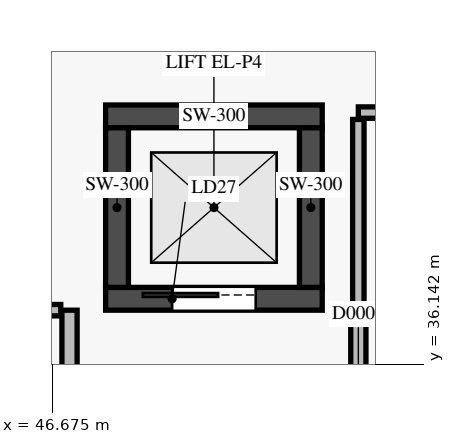
"""IFC4 building model, lengths in metres.
Left out: names, types, materials, properties, quantities, classifications, styles, units other than length and angle.
Written with IfcOpenShell. Run it as: python <this file> out.ifc"""

import sys

from ifc_helpers import new_model, si_unit, direction, frame, frame_2d, origin, place, context, subcontext, project, spatial, rectangle, extrude, element, fill, save


model = new_model("IFC4")
c1 = context("Model", 3, precision=1e-05, world=origin(), true_north=direction((0.0, 1.0)))
c2 = subcontext(c1, "Body", "Model", "MODEL_VIEW")
j1 = project(units=[si_unit("LENGTHUNIT", "METRE"), si_unit("PLANEANGLEUNIT", "RADIAN")], contexts=[c1])
p1 = place(None, origin())
s1 = spatial("IfcSite", under=j1, at=p1, CompositionType="ELEMENT")
p2 = place(p1, origin())
s2 = spatial("IfcBuilding", under=s1, at=p2, CompositionType="ELEMENT")
p3 = place(p2, origin())
s3 = spatial("IfcBuildingStorey", under=s2, at=p3, CompositionType="ELEMENT", Elevation=0.0)
p4 = place(p3, frame((47.375, 37.0, 0.0), z_axis=(0.0, 0.0, 1.0), x_axis=(1.0, 0.0, 0.0)))
e1 = element("IfcWall", 1, at=p4, inside=s3, PredefinedType="SHEAR", context=c2, shape_type="SweptSolid", body=[
    extrude(rectangle(XDim=2.85, YDim=0.3, at=frame_2d((1.425, 0.0))), origin(), (0.0, 0.0, 1.0), 4.55),
])
p5 = place(p4, frame((0.875, 0.0, 0.0)))
e2 = element("IfcOpeningElement", 2, at=p5, cuts=e1, PredefinedType="OPENING", context=c2, shape_type="SweptSolid", body=[
    extrude(rectangle(XDim=1.1, YDim=2.15, at=frame_2d((0.55, 1.075))), frame((0.0, 0.16, 0.0), z_axis=(0.0, -1.0, 0.0), x_axis=(1.0, 0.0, 0.0)), (0.0, 0.0, 1.0), 0.32),
])
p6 = place(p3, frame((47.375, 39.4, 0.0), z_axis=(0.0, 0.0, 1.0), x_axis=(1.0, 0.0, 0.0)))
e3 = element("IfcWall", 3, at=p6, inside=s3, PredefinedType="SHEAR", context=c2, shape_type="SweptSolid", body=[
    extrude(rectangle(XDim=2.85, YDim=0.3, at=frame_2d((1.425, 0.0))), origin(), (0.0, 0.0, 1.0), 4.55),
])
for number, where, z_axis, x_axis in (
    (4, (47.525, 37.15, 0.0), (0.0, 0.0, 1.0), (0.0, 1.0, 0.0)),
    (5, (50.075, 37.15, 0.0), (0.0, 0.0, 1.0), (0.0, 1.0, 0.0)),
):
    element("IfcWall", number, at=place(p3, frame(where, z_axis=z_axis, x_axis=x_axis)), inside=s3, PredefinedType="SHEAR", context=c2, shape_type="SweptSolid", body=[
        extrude(rectangle(XDim=2.1, YDim=0.3, at=frame_2d((1.05, 0.0))), origin(), (0.0, 0.0, 1.0), 4.55),
    ])
p7 = place(p3, frame((50.7, 33.25, 0.0), z_axis=(0.0, 0.0, 1.0), x_axis=(0.0, 1.0, 0.0)))
e6 = element("IfcWall", 6, at=p7, inside=s3, PredefinedType="PARTITIONING", context=c2, shape_type="SweptSolid", body=[
    extrude(rectangle(XDim=3.6, YDim=0.2, at=frame_2d((1.8, 0.0))), origin(), (0.0, 0.0, 1.0), 3.735),
])
p8 = place(p7, frame((1.1, 0.0, 0.0)))
e7 = element("IfcOpeningElement", 7, at=p8, cuts=e6, PredefinedType="OPENING", context=c2, shape_type="SweptSolid", body=[
    extrude(rectangle(XDim=1.4, YDim=2.2, at=frame_2d((0.7, 1.1))), frame((0.0, 0.11, 0.0), z_axis=(0.0, -1.0, 0.0), x_axis=(1.0, 0.0, 0.0)), (0.0, 0.0, 1.0), 0.22),
])
p9 = place(p3, frame((46.9, 33.365, 0.0), z_axis=(0.0, 0.0, 1.0), x_axis=(0.0, 1.0, 0.0)))
e8 = element("IfcWall", 8, at=p9, inside=s3, PredefinedType="PARTITIONING", context=c2, shape_type="SweptSolid", body=[
    extrude(rectangle(XDim=3.485, YDim=0.2, at=frame_2d((1.743, 0.0))), origin(), (0.0, 0.0, 1.0), 3.735),
])
p10 = place(p3, frame((50.7, 39.45, 0.0), z_axis=(0.0, 0.0, 1.0), x_axis=(1.0, 0.0, 0.0)))
e9 = element("IfcWall", 9, at=p10, inside=s3, PredefinedType="PARTITIONING", context=c2, shape_type="SweptSolid", body=[
    extrude(rectangle(XDim=1.685, YDim=0.15, at=frame_2d((0.843, 0.0))), origin(), (0.0, 0.0, 1.0), 3.985),
])
p11 = place(p3, frame((50.7, 36.865, 0.0), z_axis=(0.0, 0.0, 1.0), x_axis=(0.0, 1.0, 0.0)))
e10 = element("IfcWall", 10, at=p11, inside=s3, PredefinedType="PARTITIONING", context=c2, shape_type="SweptSolid", body=[
    extrude(rectangle(XDim=2.495, YDim=0.15, at=frame_2d((1.248, 0.0))), origin(), (0.0, 0.0, 1.0), 4.115),
])
p12 = place(p3, frame((45.305, 36.85, 0.0), z_axis=(0.0, 0.0, 1.0), x_axis=(1.0, 0.0, 0.0)))
e11 = element("IfcWall", 11, at=p12, inside=s3, PredefinedType="PARTITIONING", context=c2, shape_type="SweptSolid", body=[
    extrude(rectangle(XDim=1.48, YDim=0.15, at=frame_2d((0.74, 0.0))), origin(), (0.0, 0.0, 1.0), 4.115),
])
p13 = place(p5, origin())
e12 = element("IfcDoor", 12, at=p13, inside=s3, OperationType="SLIDING_TO_LEFT", PredefinedType="DOOR", context=c2, shape_type="SweptSolid", body=[
    extrude(rectangle(XDim=1.1, YDim=2.15, at=frame_2d((0.55, 1.075))), frame((0.0, 0.025, 0.0), z_axis=(0.0, -1.0, 0.0), x_axis=(1.0, 0.0, 0.0)), (0.0, 0.0, 1.0), 0.05),
])
fill(e2, e12)
save(model, sys.argv[1])
